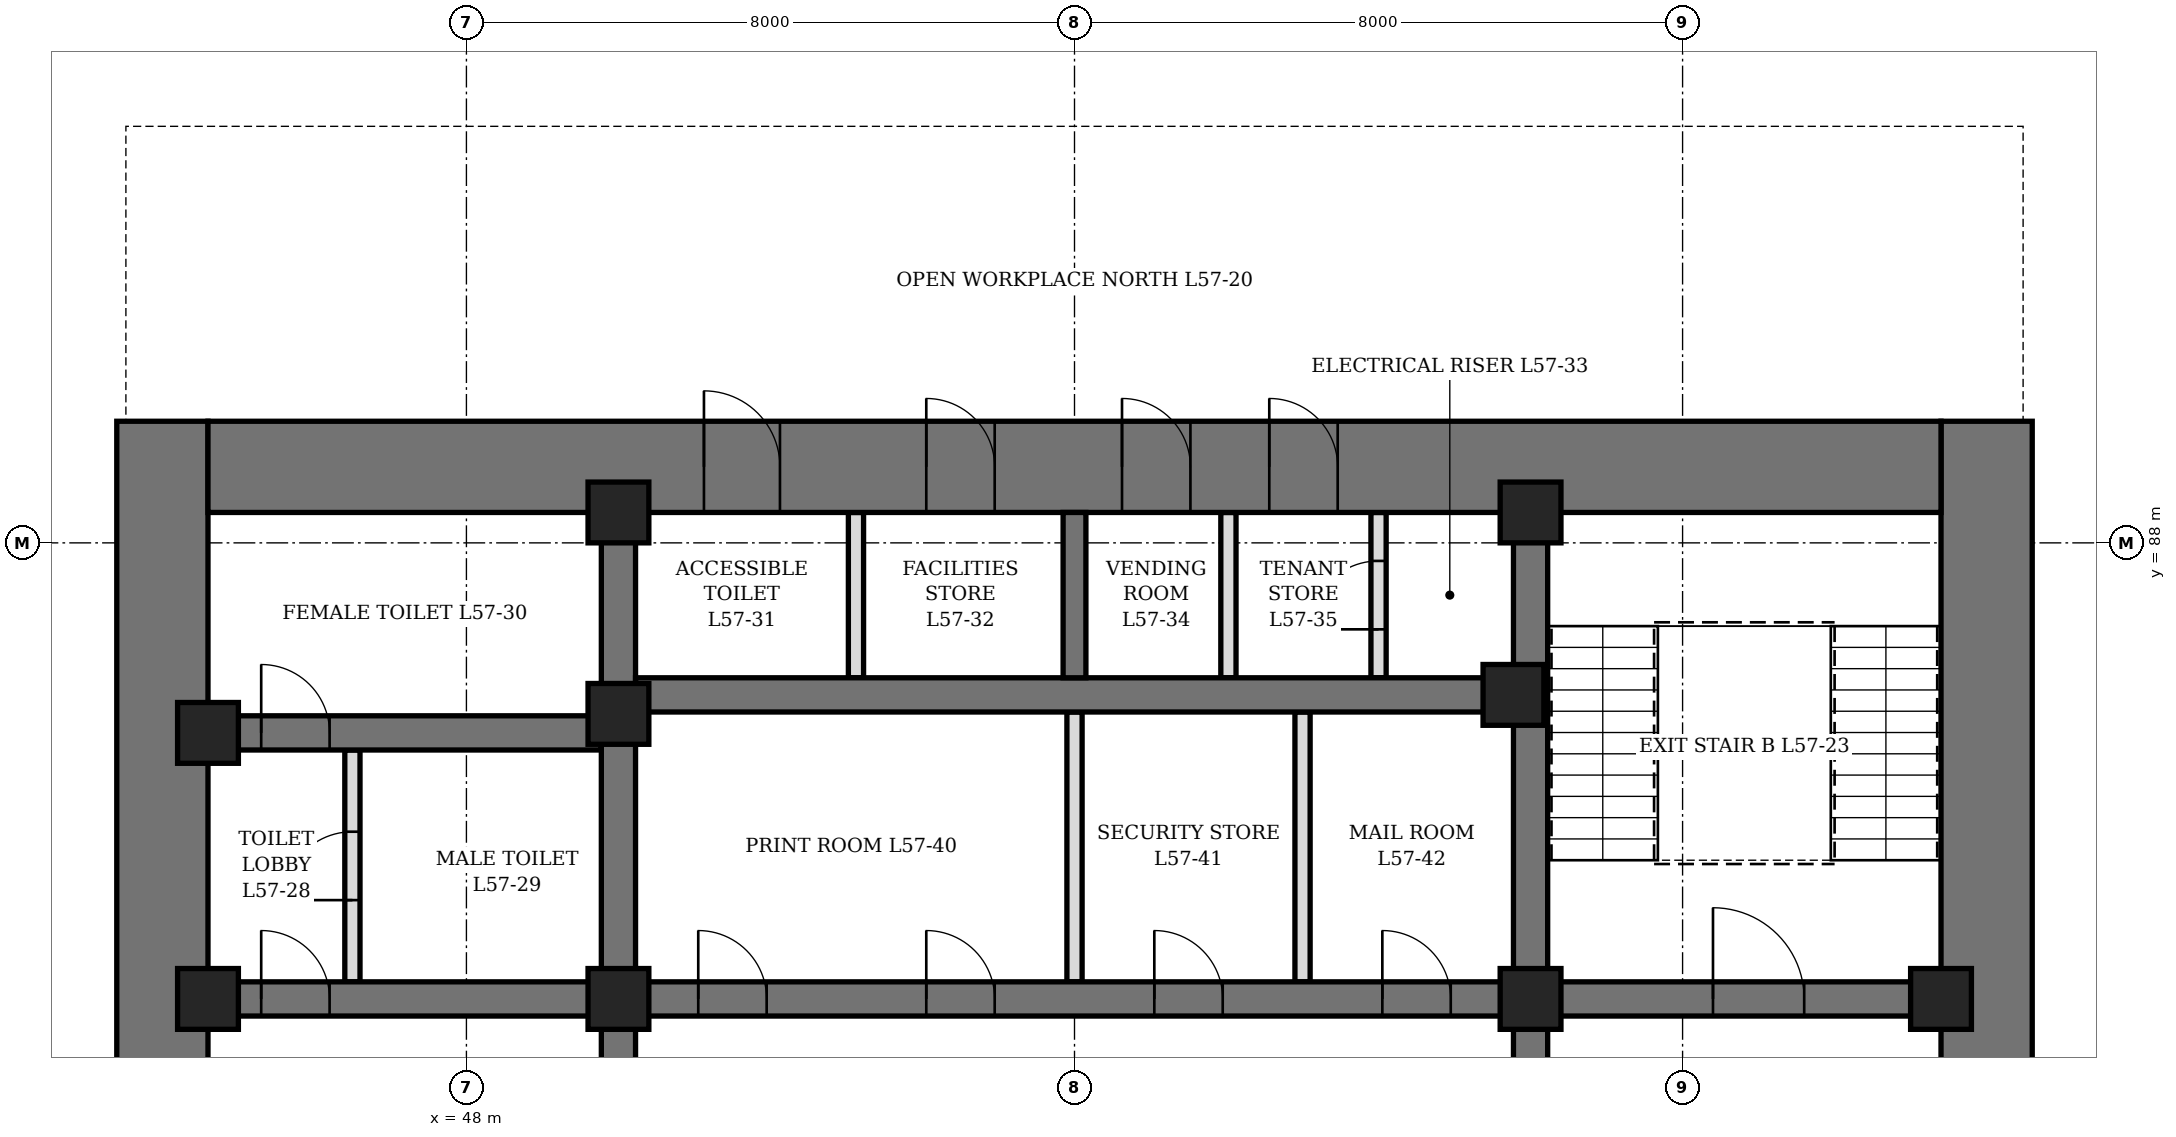
"""IFC4 building model, lengths in metres.
Left out: names, types, materials, properties, quantities, classifications, styles, units other than length and angle.
Written with IfcOpenShell. Run it as: python <this file> out.ifc"""

import sys

from ifc_helpers import new_model, si_unit, direction, frame, frame_2d, origin, origin_2d, place, context, subcontext, project, spatial, rectangle, hollow_rectangle, extrude, element, fill, save


model = new_model("IFC4")
c1 = context("Model", 3, precision=1e-05, world=origin(), true_north=direction((0.0, 1.0)))
c2 = subcontext(c1, "Body", "Model", "MODEL_VIEW")
j1 = project(units=[si_unit("LENGTHUNIT", "METRE"), si_unit("PLANEANGLEUNIT", "RADIAN")], contexts=[c1])
p1 = place(None, origin())
s1 = spatial("IfcSite", under=j1, at=p1, CompositionType="ELEMENT")
p2 = place(p1, origin())
s2 = spatial("IfcBuilding", under=s1, at=p2, CompositionType="ELEMENT")
p3 = place(p2, frame((0.0, 0.0, 254.5)))
s3 = spatial("IfcBuildingStorey", under=s2, at=p3, CompositionType="ELEMENT", Elevation=254.5)
p4 = place(p3, frame((44.0, 70.4, 0.0), z_axis=(0.0, 0.0, 1.0), x_axis=(0.0, 1.0, 0.0)))
e1 = element("IfcWall", 1, at=p4, inside=s3, PredefinedType="SHEAR", context=c2, shape_type="SweptSolid", body=[
    extrude(rectangle(XDim=19.2, YDim=1.2, at=frame_2d((9.6, 0.0))), origin(), (0.0, 0.0, 1.0), 4.2),
])
p5 = place(p4, frame((8.6, 0.0, 0.0)))
e2 = element("IfcOpeningElement", 2, at=p5, cuts=e1, PredefinedType="OPENING", context=c2, shape_type="SweptSolid", body=[
    extrude(rectangle(XDim=2.0, YDim=2.4, at=frame_2d((1.0, 1.2))), frame((0.0, 0.61, 0.0), z_axis=(0.0, -1.0, 0.0), x_axis=(1.0, 0.0, 0.0)), (0.0, 0.0, 1.0), 1.22),
])
p6 = place(p3, frame((68.0, 70.4, 0.0), z_axis=(0.0, 0.0, 1.0), x_axis=(0.0, 1.0, 0.0)))
e3 = element("IfcWall", 3, at=p6, inside=s3, PredefinedType="SHEAR", context=c2, shape_type="SweptSolid", body=[
    extrude(rectangle(XDim=19.2, YDim=1.2, at=frame_2d((9.6, 0.0))), origin(), (0.0, 0.0, 1.0), 4.2),
])
p7 = place(p6, frame((8.6, 0.0, 0.0)))
e4 = element("IfcOpeningElement", 4, at=p7, cuts=e3, PredefinedType="OPENING", context=c2, shape_type="SweptSolid", body=[
    extrude(rectangle(XDim=2.0, YDim=2.4, at=frame_2d((1.0, 1.2))), frame((0.0, 0.61, 0.0), z_axis=(0.0, -1.0, 0.0), x_axis=(1.0, 0.0, 0.0)), (0.0, 0.0, 1.0), 1.22),
])
p8 = place(p3, frame((44.6, 89.0, 0.0), z_axis=(0.0, 0.0, 1.0), x_axis=(1.0, 0.0, 0.0)))
e5 = element("IfcWall", 5, at=p8, inside=s3, PredefinedType="SHEAR", context=c2, shape_type="SweptSolid", body=[
    extrude(rectangle(XDim=22.8, YDim=1.2, at=frame_2d((11.4, 0.0))), origin(), (0.0, 0.0, 1.0), 4.2),
])
p9 = place(p8, frame((6.525, 0.0, 0.0)))
e6 = element("IfcOpeningElement", 6, at=p9, cuts=e5, PredefinedType="OPENING", context=c2, shape_type="SweptSolid", body=[
    extrude(rectangle(XDim=1.0, YDim=2.1, at=frame_2d((0.5, 1.05))), frame((0.0, 0.61, 0.0), z_axis=(0.0, -1.0, 0.0), x_axis=(1.0, 0.0, 0.0)), (0.0, 0.0, 1.0), 1.22),
])
p10 = place(p8, frame((9.45, 0.0, 0.0)))
e7 = element("IfcOpeningElement", 7, at=p10, cuts=e5, PredefinedType="OPENING", context=c2, shape_type="SweptSolid", body=[
    extrude(rectangle(XDim=0.9, YDim=2.1, at=frame_2d((0.45, 1.05))), frame((0.0, 0.61, 0.0), z_axis=(0.0, -1.0, 0.0), x_axis=(1.0, 0.0, 0.0)), (0.0, 0.0, 1.0), 1.22),
])
p11 = place(p8, frame((12.025, 0.0, 0.0)))
e8 = element("IfcOpeningElement", 8, at=p11, cuts=e5, PredefinedType="OPENING", context=c2, shape_type="SweptSolid", body=[
    extrude(rectangle(XDim=0.9, YDim=2.1, at=frame_2d((0.45, 1.05))), frame((0.0, 0.61, 0.0), z_axis=(0.0, -1.0, 0.0), x_axis=(1.0, 0.0, 0.0)), (0.0, 0.0, 1.0), 1.22),
])
p12 = place(p8, frame((13.962, 0.0, 0.0)))
e9 = element("IfcOpeningElement", 9, at=p12, cuts=e5, PredefinedType="OPENING", context=c2, shape_type="SweptSolid", body=[
    extrude(rectangle(XDim=0.9, YDim=2.1, at=frame_2d((0.45, 1.05))), frame((0.0, 0.61, 0.0), z_axis=(0.0, -1.0, 0.0), x_axis=(1.0, 0.0, 0.0)), (0.0, 0.0, 1.0), 1.22),
])
p13 = place(p3, frame((50.0, 71.6, 0.0), z_axis=(0.0, 0.0, 1.0), x_axis=(0.0, 1.0, 0.0)))
e10 = element("IfcWall", 10, at=p13, inside=s3, PredefinedType="SHEAR", context=c2, shape_type="SweptSolid", body=[
    extrude(rectangle(XDim=16.8, YDim=0.45, at=frame_2d((8.4, 0.0))), origin(), (0.0, 0.0, 1.0), 4.2),
])
p14 = place(p13, frame((7.5, 0.0, 0.0)))
e11 = element("IfcOpeningElement", 11, at=p14, cuts=e10, PredefinedType="OPENING", context=c2, shape_type="SweptSolid", body=[
    extrude(rectangle(XDim=1.8, YDim=2.4, at=frame_2d((0.9, 1.2))), frame((0.0, 0.235, 0.0), z_axis=(0.0, -1.0, 0.0), x_axis=(1.0, 0.0, 0.0)), (0.0, 0.0, 1.0), 0.47),
])
p15 = place(p3, frame((62.0, 71.6, 0.0), z_axis=(0.0, 0.0, 1.0), x_axis=(0.0, 1.0, 0.0)))
e12 = element("IfcWall", 12, at=p15, inside=s3, PredefinedType="SHEAR", context=c2, shape_type="SweptSolid", body=[
    extrude(rectangle(XDim=16.8, YDim=0.45, at=frame_2d((8.4, 0.0))), origin(), (0.0, 0.0, 1.0), 4.2),
])
p16 = place(p15, frame((7.5, 0.0, 0.0)))
e13 = element("IfcOpeningElement", 13, at=p16, cuts=e12, PredefinedType="OPENING", context=c2, shape_type="SweptSolid", body=[
    extrude(rectangle(XDim=1.8, YDim=2.4, at=frame_2d((0.9, 1.2))), frame((0.0, 0.235, 0.0), z_axis=(0.0, -1.0, 0.0), x_axis=(1.0, 0.0, 0.0)), (0.0, 0.0, 1.0), 0.47),
])
p17 = place(p3, frame((44.6, 82.0, 0.0), z_axis=(0.0, 0.0, 1.0), x_axis=(1.0, 0.0, 0.0)))
e14 = element("IfcWall", 14, at=p17, inside=s3, PredefinedType="SHEAR", context=c2, shape_type="SweptSolid", body=[
    extrude(rectangle(XDim=5.175, YDim=0.45, at=frame_2d((2.587, 0.0))), origin(), (0.0, 0.0, 1.0), 4.2),
])
p18 = place(p17, frame((0.7, 0.0, 0.0)))
e15 = element("IfcOpeningElement", 15, at=p18, cuts=e14, PredefinedType="OPENING", context=c2, shape_type="SweptSolid", body=[
    extrude(rectangle(XDim=0.9, YDim=2.1, at=frame_2d((0.45, 1.05))), frame((0.0, 0.235, 0.0), z_axis=(0.0, -1.0, 0.0), x_axis=(1.0, 0.0, 0.0)), (0.0, 0.0, 1.0), 0.47),
])
p19 = place(p3, frame((44.6, 85.5, 0.0), z_axis=(0.0, 0.0, 1.0), x_axis=(1.0, 0.0, 0.0)))
e16 = element("IfcWall", 16, at=p19, inside=s3, PredefinedType="SHEAR", context=c2, shape_type="SweptSolid", body=[
    extrude(rectangle(XDim=5.175, YDim=0.45, at=frame_2d((2.587, 0.0))), origin(), (0.0, 0.0, 1.0), 4.2),
])
p20 = place(p19, frame((0.7, 0.0, 0.0)))
e17 = element("IfcOpeningElement", 17, at=p20, cuts=e16, PredefinedType="OPENING", context=c2, shape_type="SweptSolid", body=[
    extrude(rectangle(XDim=0.9, YDim=2.1, at=frame_2d((0.45, 1.05))), frame((0.0, 0.235, 0.0), z_axis=(0.0, -1.0, 0.0), x_axis=(1.0, 0.0, 0.0)), (0.0, 0.0, 1.0), 0.47),
])
p21 = place(p3, frame((62.225, 82.0, 0.0), z_axis=(0.0, 0.0, 1.0), x_axis=(1.0, 0.0, 0.0)))
e18 = element("IfcWall", 18, at=p21, inside=s3, PredefinedType="SHEAR", context=c2, shape_type="SweptSolid", body=[
    extrude(rectangle(XDim=5.175, YDim=0.45, at=frame_2d((2.587, 0.0))), origin(), (0.0, 0.0, 1.0), 4.2),
])
p22 = place(p21, frame((2.175, 0.0, 0.0)))
e19 = element("IfcOpeningElement", 19, at=p22, cuts=e18, PredefinedType="OPENING", context=c2, shape_type="SweptSolid", body=[
    extrude(rectangle(XDim=1.2, YDim=2.1, at=frame_2d((0.6, 1.05))), frame((0.0, 0.235, 0.0), z_axis=(0.0, -1.0, 0.0), x_axis=(1.0, 0.0, 0.0)), (0.0, 0.0, 1.0), 0.47),
])
p23 = place(p3, frame((50.225, 82.0, 0.0), z_axis=(0.0, 0.0, 1.0), x_axis=(1.0, 0.0, 0.0)))
e20 = element("IfcWall", 20, at=p23, inside=s3, PredefinedType="SHEAR", context=c2, shape_type="SweptSolid", body=[
    extrude(rectangle(XDim=11.55, YDim=0.45, at=frame_2d((5.775, 0.0))), origin(), (0.0, 0.0, 1.0), 4.2),
])
p24 = place(p23, frame((0.825, 0.0, 0.0)))
e21 = element("IfcOpeningElement", 21, at=p24, cuts=e20, PredefinedType="OPENING", context=c2, shape_type="SweptSolid", body=[
    extrude(rectangle(XDim=0.9, YDim=2.1, at=frame_2d((0.45, 1.05))), frame((0.0, 0.235, 0.0), z_axis=(0.0, -1.0, 0.0), x_axis=(1.0, 0.0, 0.0)), (0.0, 0.0, 1.0), 0.47),
])
p25 = place(p23, frame((3.825, 0.0, 0.0)))
e22 = element("IfcOpeningElement", 22, at=p25, cuts=e20, PredefinedType="OPENING", context=c2, shape_type="SweptSolid", body=[
    extrude(rectangle(XDim=0.9, YDim=2.1, at=frame_2d((0.45, 1.05))), frame((0.0, 0.235, 0.0), z_axis=(0.0, -1.0, 0.0), x_axis=(1.0, 0.0, 0.0)), (0.0, 0.0, 1.0), 0.47),
])
p26 = place(p23, frame((6.825, 0.0, 0.0)))
e23 = element("IfcOpeningElement", 23, at=p26, cuts=e20, PredefinedType="OPENING", context=c2, shape_type="SweptSolid", body=[
    extrude(rectangle(XDim=0.9, YDim=2.1, at=frame_2d((0.45, 1.05))), frame((0.0, 0.235, 0.0), z_axis=(0.0, -1.0, 0.0), x_axis=(1.0, 0.0, 0.0)), (0.0, 0.0, 1.0), 0.47),
])
p27 = place(p23, frame((9.825, 0.0, 0.0)))
e24 = element("IfcOpeningElement", 24, at=p27, cuts=e20, PredefinedType="OPENING", context=c2, shape_type="SweptSolid", body=[
    extrude(rectangle(XDim=0.9, YDim=2.1, at=frame_2d((0.45, 1.05))), frame((0.0, 0.235, 0.0), z_axis=(0.0, -1.0, 0.0), x_axis=(1.0, 0.0, 0.0)), (0.0, 0.0, 1.0), 0.47),
])
p28 = place(p3, frame((50.225, 86.0, 0.0), z_axis=(0.0, 0.0, 1.0), x_axis=(1.0, 0.0, 0.0)))
e25 = element("IfcWall", 25, at=p28, inside=s3, PredefinedType="SHEAR", context=c2, shape_type="SweptSolid", body=[
    extrude(rectangle(XDim=11.55, YDim=0.45, at=frame_2d((5.775, 0.0))), origin(), (0.0, 0.0, 1.0), 4.2),
])
p29 = place(p3, frame((56.0, 86.225, 0.0), z_axis=(0.0, 0.0, 1.0), x_axis=(0.0, 1.0, 0.0)))
e26 = element("IfcWall", 26, at=p29, inside=s3, PredefinedType="SHEAR", context=c2, shape_type="SweptSolid", body=[
    extrude(rectangle(XDim=2.175, YDim=0.3, at=frame_2d((1.087, 0.0))), origin(), (0.0, 0.0, 1.0), 4.2),
])
for number, where, z_axis, x_axis in (
    (27, (44.6, 82.0, 0.0), (0.0, 0.0, 1.0), (1.0, 0.0, 0.0)),
    (28, (44.6, 85.5, 0.0), (0.0, 0.0, 1.0), (1.0, 0.0, 0.0)),
    (29, (50.0, 82.0, 0.0), (0.0, 0.0, 1.0), (1.0, 0.0, 0.0)),
    (30, (50.0, 85.75, 0.0), (0.0, 0.0, 1.0), (1.0, 0.0, 0.0)),
    (31, (50.0, 88.4, 0.0), (0.0, 0.0, 1.0), (1.0, 0.0, 0.0)),
    (32, (61.775, 86.0, 0.0), (0.0, 0.0, 1.0), (1.0, 0.0, 0.0)),
    (33, (62.0, 82.0, 0.0), (0.0, 0.0, 1.0), (1.0, 0.0, 0.0)),
    (34, (62.0, 88.4, 0.0), (0.0, 0.0, 1.0), (1.0, 0.0, 0.0)),
    (35, (67.4, 82.0, 0.0), (0.0, 0.0, 1.0), (1.0, 0.0, 0.0)),
):
    element("IfcColumn", number, at=place(p3, frame(where, z_axis=z_axis, x_axis=x_axis)), inside=s3, PredefinedType="COLUMN", context=c2, shape_type="SweptSolid", body=[
        extrude(hollow_rectangle(XDim=0.8, YDim=0.8, WallThickness=0.1, at=origin_2d()), origin(), (0.0, 0.0, 1.0), 4.2),
    ])
p30 = place(p3, frame((46.5, 82.225, 0.0), z_axis=(0.0, 0.0, 1.0), x_axis=(0.0, 1.0, 0.0)))
e36 = element("IfcWall", 36, at=p30, inside=s3, PredefinedType="PARTITIONING", context=c2, shape_type="SweptSolid", body=[
    extrude(rectangle(XDim=3.05, YDim=0.2, at=frame_2d((1.525, 0.0))), origin(), (0.0, 0.0, 1.0), 4.04),
])
p31 = place(p30, frame((1.075, 0.0, 0.0)))
e37 = element("IfcOpeningElement", 37, at=p31, cuts=e36, PredefinedType="OPENING", context=c2, shape_type="SweptSolid", body=[
    extrude(rectangle(XDim=0.9, YDim=2.1, at=frame_2d((0.45, 1.05))), frame((0.0, 0.11, 0.0), z_axis=(0.0, -1.0, 0.0), x_axis=(1.0, 0.0, 0.0)), (0.0, 0.0, 1.0), 0.22),
])
p32 = place(p3, frame((53.125, 86.225, 0.0), z_axis=(0.0, 0.0, 1.0), x_axis=(0.0, 1.0, 0.0)))
e38 = element("IfcWall", 38, at=p32, inside=s3, PredefinedType="PARTITIONING", context=c2, shape_type="SweptSolid", body=[
    extrude(rectangle(XDim=2.175, YDim=0.2, at=frame_2d((1.087, 0.0))), origin(), (0.0, 0.0, 1.0), 4.04),
])
p33 = place(p3, frame((60.0, 86.225, 0.0), z_axis=(0.0, 0.0, 1.0), x_axis=(0.0, 1.0, 0.0)))
e39 = element("IfcWall", 39, at=p33, inside=s3, PredefinedType="PARTITIONING", context=c2, shape_type="SweptSolid", body=[
    extrude(rectangle(XDim=2.175, YDim=0.2, at=frame_2d((1.087, 0.0))), origin(), (0.0, 0.0, 1.0), 4.04),
])
p34 = place(p33, frame((0.637, 0.0, 0.0)))
e40 = element("IfcOpeningElement", 40, at=p34, cuts=e39, PredefinedType="OPENING", context=c2, shape_type="SweptSolid", body=[
    extrude(rectangle(XDim=0.9, YDim=2.1, at=frame_2d((0.45, 1.05))), frame((0.0, 0.11, 0.0), z_axis=(0.0, -1.0, 0.0), x_axis=(1.0, 0.0, 0.0)), (0.0, 0.0, 1.0), 0.22),
])
p35 = place(p3, frame((58.025, 86.225, 0.0), z_axis=(0.0, 0.0, 1.0), x_axis=(0.0, 1.0, 0.0)))
e41 = element("IfcWall", 41, at=p35, inside=s3, PredefinedType="PARTITIONING", context=c2, shape_type="SweptSolid", body=[
    extrude(rectangle(XDim=2.175, YDim=0.2, at=frame_2d((1.087, 0.0))), origin(), (0.0, 0.0, 1.0), 4.04),
])
p36 = place(p3, frame((56.0, 82.225, 0.0), z_axis=(0.0, 0.0, 1.0), x_axis=(0.0, 1.0, 0.0)))
e42 = element("IfcWall", 42, at=p36, inside=s3, PredefinedType="PARTITIONING", context=c2, shape_type="SweptSolid", body=[
    extrude(rectangle(XDim=3.55, YDim=0.2, at=frame_2d((1.775, 0.0))), origin(), (0.0, 0.0, 1.0), 3.14),
])
p37 = place(p3, frame((59.0, 82.225, 0.0), z_axis=(0.0, 0.0, 1.0), x_axis=(0.0, 1.0, 0.0)))
e43 = element("IfcWall", 43, at=p37, inside=s3, PredefinedType="PARTITIONING", context=c2, shape_type="SweptSolid", body=[
    extrude(rectangle(XDim=3.55, YDim=0.2, at=frame_2d((1.775, 0.0))), origin(), (0.0, 0.0, 1.0), 4.04),
])
p38 = place(p18, origin())
e44 = element("IfcDoor", 44, at=p38, inside=s3, OperationType="SINGLE_SWING_LEFT", PredefinedType="DOOR", context=c2, shape_type="SweptSolid", body=[
    extrude(rectangle(XDim=0.9, YDim=2.1, at=frame_2d((0.45, 1.05))), frame((0.0, 0.225, 0.0), z_axis=(0.0, -1.0, 0.0), x_axis=(1.0, 0.0, 0.0)), (0.0, 0.0, 1.0), 0.449),
])
fill(e15, e44)
p39 = place(p31, origin())
e45 = element("IfcDoor", 45, at=p39, inside=s3, OperationType="SINGLE_SWING_RIGHT", PredefinedType="DOOR", context=c2, shape_type="SweptSolid", body=[
    extrude(rectangle(XDim=0.9, YDim=2.1, at=frame_2d((0.45, 1.05))), frame((0.0, 0.1, 0.0), z_axis=(0.0, -1.0, 0.0), x_axis=(1.0, 0.0, 0.0)), (0.0, 0.0, 1.0), 0.199),
])
fill(e37, e45)
p40 = place(p20, origin())
e46 = element("IfcDoor", 46, at=p40, inside=s3, OperationType="SINGLE_SWING_RIGHT", PredefinedType="DOOR", context=c2, shape_type="SweptSolid", body=[
    extrude(rectangle(XDim=0.9, YDim=2.1, at=frame_2d((0.45, 1.05))), frame((0.0, 0.225, 0.0), z_axis=(0.0, -1.0, 0.0), x_axis=(1.0, 0.0, 0.0)), (0.0, 0.0, 1.0), 0.449),
])
fill(e17, e46)
p41 = place(p9, origin())
e47 = element("IfcDoor", 47, at=p41, inside=s3, OperationType="SINGLE_SWING_LEFT", PredefinedType="DOOR", context=c2, shape_type="SweptSolid", body=[
    extrude(rectangle(XDim=1.0, YDim=2.1, at=frame_2d((0.5, 1.05))), frame((0.0, 0.35, 0.0), z_axis=(0.0, -1.0, 0.0), x_axis=(1.0, 0.0, 0.0)), (0.0, 0.0, 1.0), 0.7),
])
fill(e6, e47)
p42 = place(p10, origin())
e48 = element("IfcDoor", 48, at=p42, inside=s3, OperationType="SINGLE_SWING_LEFT", PredefinedType="DOOR", context=c2, shape_type="SweptSolid", body=[
    extrude(rectangle(XDim=0.9, YDim=2.1, at=frame_2d((0.45, 1.05))), frame((0.0, 0.35, 0.0), z_axis=(0.0, -1.0, 0.0), x_axis=(1.0, 0.0, 0.0)), (0.0, 0.0, 1.0), 0.7),
])
fill(e7, e48)
p43 = place(p11, origin())
e49 = element("IfcDoor", 49, at=p43, inside=s3, OperationType="SINGLE_SWING_LEFT", PredefinedType="DOOR", context=c2, shape_type="SweptSolid", body=[
    extrude(rectangle(XDim=0.9, YDim=2.1, at=frame_2d((0.45, 1.05))), frame((0.0, 0.35, 0.0), z_axis=(0.0, -1.0, 0.0), x_axis=(1.0, 0.0, 0.0)), (0.0, 0.0, 1.0), 0.7),
])
fill(e8, e49)
p44 = place(p12, origin())
e50 = element("IfcDoor", 50, at=p44, inside=s3, OperationType="SINGLE_SWING_LEFT", PredefinedType="DOOR", context=c2, shape_type="SweptSolid", body=[
    extrude(rectangle(XDim=0.9, YDim=2.1, at=frame_2d((0.45, 1.05))), frame((0.0, 0.35, 0.0), z_axis=(0.0, -1.0, 0.0), x_axis=(1.0, 0.0, 0.0)), (0.0, 0.0, 1.0), 0.7),
])
fill(e9, e50)
p45 = place(p34, origin())
e51 = element("IfcDoor", 51, at=p45, inside=s3, OperationType="SINGLE_SWING_LEFT", PredefinedType="DOOR", context=c2, shape_type="SweptSolid", body=[
    extrude(rectangle(XDim=0.9, YDim=2.1, at=frame_2d((0.45, 1.05))), frame((0.0, 0.1, 0.0), z_axis=(0.0, -1.0, 0.0), x_axis=(1.0, 0.0, 0.0)), (0.0, 0.0, 1.0), 0.199),
])
fill(e40, e51)
p46 = place(p24, origin())
e52 = element("IfcDoor", 52, at=p46, inside=s3, OperationType="SINGLE_SWING_LEFT", PredefinedType="DOOR", context=c2, shape_type="SweptSolid", body=[
    extrude(rectangle(XDim=0.9, YDim=2.1, at=frame_2d((0.45, 1.05))), frame((0.0, 0.225, 0.0), z_axis=(0.0, -1.0, 0.0), x_axis=(1.0, 0.0, 0.0)), (0.0, 0.0, 1.0), 0.449),
])
fill(e21, e52)
p47 = place(p25, origin())
e53 = element("IfcDoor", 53, at=p47, inside=s3, OperationType="SINGLE_SWING_LEFT", PredefinedType="DOOR", context=c2, shape_type="SweptSolid", body=[
    extrude(rectangle(XDim=0.9, YDim=2.1, at=frame_2d((0.45, 1.05))), frame((0.0, 0.225, 0.0), z_axis=(0.0, -1.0, 0.0), x_axis=(1.0, 0.0, 0.0)), (0.0, 0.0, 1.0), 0.449),
])
fill(e22, e53)
p48 = place(p26, origin())
e54 = element("IfcDoor", 54, at=p48, inside=s3, OperationType="SINGLE_SWING_LEFT", PredefinedType="DOOR", context=c2, shape_type="SweptSolid", body=[
    extrude(rectangle(XDim=0.9, YDim=2.1, at=frame_2d((0.45, 1.05))), frame((0.0, 0.225, 0.0), z_axis=(0.0, -1.0, 0.0), x_axis=(1.0, 0.0, 0.0)), (0.0, 0.0, 1.0), 0.449),
])
fill(e23, e54)
p49 = place(p27, origin())
e55 = element("IfcDoor", 55, at=p49, inside=s3, OperationType="SINGLE_SWING_LEFT", PredefinedType="DOOR", context=c2, shape_type="SweptSolid", body=[
    extrude(rectangle(XDim=0.9, YDim=2.1, at=frame_2d((0.45, 1.05))), frame((0.0, 0.225, 0.0), z_axis=(0.0, -1.0, 0.0), x_axis=(1.0, 0.0, 0.0)), (0.0, 0.0, 1.0), 0.449),
])
fill(e24, e55)
p50 = place(p22, origin())
e56 = element("IfcDoor", 56, at=p50, inside=s3, OperationType="SINGLE_SWING_LEFT", PredefinedType="DOOR", context=c2, shape_type="SweptSolid", body=[
    extrude(rectangle(XDim=1.2, YDim=2.1, at=frame_2d((0.6, 1.05))), frame((0.0, 0.225, 0.0), z_axis=(0.0, -1.0, 0.0), x_axis=(1.0, 0.0, 0.0)), (0.0, 0.0, 1.0), 0.449),
])
fill(e19, e56)
save(model, sys.argv[1])
